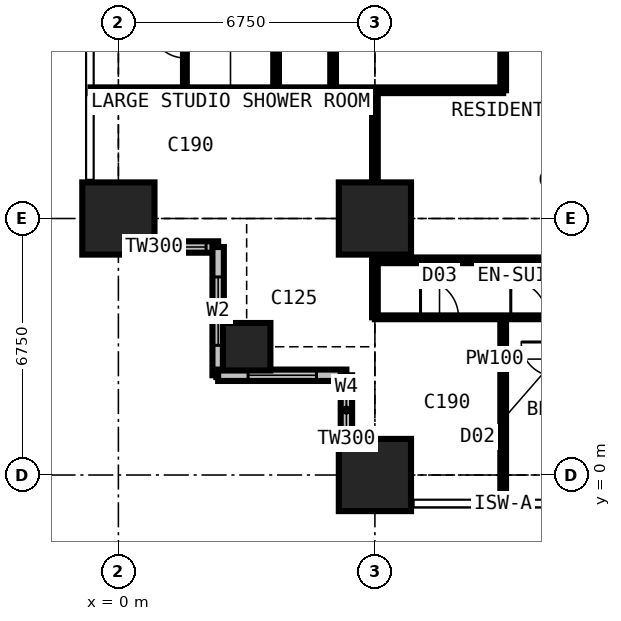
"""IFC4 building model, lengths in metres.
Left out: names, types, materials, properties, quantities, classifications, styles, units other than length and angle.
Written with IfcOpenShell. Run it as: python <this file> out.ifc"""

import sys

from ifc_helpers import new_model, si_unit, direction, frame, frame_2d, origin, origin_2d, place, context, subcontext, project, spatial, rectangle, extrude, element, fill, save


model = new_model("IFC4")
c1 = context("Model", 3, precision=1e-05, world=origin(), true_north=direction((0.0, 1.0)))
c2 = subcontext(c1, "Body", "Model", "MODEL_VIEW")
j1 = project(units=[si_unit("LENGTHUNIT", "METRE"), si_unit("PLANEANGLEUNIT", "RADIAN")], contexts=[c1])
p1 = place(None, origin())
s1 = spatial("IfcSite", under=j1, at=p1, CompositionType="ELEMENT")
p2 = place(p1, origin())
s2 = spatial("IfcBuilding", under=s1, at=p2, CompositionType="ELEMENT")
p3 = place(p2, frame((0.0, 0.0, 39.6)))
s3 = spatial("IfcBuildingStorey", under=s2, at=p3, CompositionType="ELEMENT", Elevation=39.6)
p4 = place(p3, frame((0.0, 6.75, 0.0), z_axis=(0.0, 0.0, 1.0), x_axis=(1.0, 0.0, 0.0)))
e1 = element("IfcColumn", 1, at=p4, inside=s3, PredefinedType="COLUMN", context=c2, shape_type="SweptSolid", body=[
    extrude(rectangle(XDim=1.9, YDim=1.9, at=origin_2d()), origin(), (0.0, 0.0, 1.0), 3.6),
])
p5 = place(p3, frame((3.375, 3.375, 0.0), z_axis=(0.0, 0.0, 1.0), x_axis=(1.0, 0.0, 0.0)))
e2 = element("IfcColumn", 2, at=p5, inside=s3, PredefinedType="COLUMN", context=c2, shape_type="SweptSolid", body=[
    extrude(rectangle(XDim=1.25, YDim=1.25, at=origin_2d()), origin(), (0.0, 0.0, 1.0), 3.6),
])
for number, where, z_axis, x_axis in (
    (3, (6.75, 0.0, 0.0), (0.0, 0.0, 1.0), (1.0, 0.0, 0.0)),
    (4, (6.75, 6.75, 0.0), (0.0, 0.0, 1.0), (1.0, 0.0, 0.0)),
):
    element("IfcColumn", number, at=place(p3, frame(where, z_axis=z_axis, x_axis=x_axis)), inside=s3, PredefinedType="COLUMN", context=c2, shape_type="SweptSolid", body=[
        extrude(rectangle(XDim=1.9, YDim=1.9, at=origin_2d()), origin(), (0.0, 0.0, 1.0), 3.6),
    ])
p6 = place(p3, frame((-0.75, 6.0, 0.0), z_axis=(0.0, 0.0, 1.0), x_axis=(1.0, 0.0, 0.0)))
e5 = element("IfcWall", 5, at=p6, inside=s3, PredefinedType="SOLIDWALL", context=c2, shape_type="SweptSolid", body=[
    extrude(rectangle(XDim=3.375, YDim=0.3, at=frame_2d((1.688, 0.0))), origin(), (0.0, 0.0, 1.0), 3.375),
])
p7 = place(p6, frame((1.857, 0.0, 0.9)))
e6 = element("IfcOpeningElement", 6, at=p7, cuts=e5, PredefinedType="OPENING", context=c2, shape_type="SweptSolid", body=[
    extrude(rectangle(XDim=1.2, YDim=1.8, at=frame_2d((0.6, 0.9))), frame((0.0, 0.16, 0.0), z_axis=(0.0, -1.0, 0.0), x_axis=(1.0, 0.0, 0.0)), (0.0, 0.0, 1.0), 0.32),
])
p8 = place(p3, frame((2.625, 6.0, 0.0), z_axis=(0.0, 0.0, 1.0), x_axis=(0.0, -1.0, 0.0)))
e7 = element("IfcWall", 7, at=p8, inside=s3, PredefinedType="SOLIDWALL", context=c2, shape_type="SweptSolid", body=[
    extrude(rectangle(XDim=3.375, YDim=0.3, at=frame_2d((1.688, 0.0))), origin(), (0.0, 0.0, 1.0), 3.375),
])
p9 = place(p8, frame((0.788, 0.0, 0.6)))
e8 = element("IfcOpeningElement", 8, at=p9, cuts=e7, PredefinedType="OPENING", context=c2, shape_type="SweptSolid", body=[
    extrude(rectangle(XDim=1.8, YDim=2.1, at=frame_2d((0.9, 1.05))), frame((0.0, 0.16, 0.0), z_axis=(0.0, -1.0, 0.0), x_axis=(1.0, 0.0, 0.0)), (0.0, 0.0, 1.0), 0.32),
])
p10 = place(p3, frame((2.625, 2.625, 0.0), z_axis=(0.0, 0.0, 1.0), x_axis=(1.0, 0.0, 0.0)))
e9 = element("IfcWall", 9, at=p10, inside=s3, PredefinedType="SOLIDWALL", context=c2, shape_type="SweptSolid", body=[
    extrude(rectangle(XDim=3.375, YDim=0.3, at=frame_2d((1.688, 0.0))), origin(), (0.0, 0.0, 1.0), 3.375),
])
p11 = place(p10, frame((0.788, 0.0, 0.6)))
e10 = element("IfcOpeningElement", 10, at=p11, cuts=e9, PredefinedType="OPENING", context=c2, shape_type="SweptSolid", body=[
    extrude(rectangle(XDim=1.8, YDim=2.1, at=frame_2d((0.9, 1.05))), frame((0.0, 0.16, 0.0), z_axis=(0.0, -1.0, 0.0), x_axis=(1.0, 0.0, 0.0)), (0.0, 0.0, 1.0), 0.32),
])
p12 = place(p3, frame((6.0, 2.625, 0.0), z_axis=(0.0, 0.0, 1.0), x_axis=(0.0, -1.0, 0.0)))
e11 = element("IfcWall", 11, at=p12, inside=s3, PredefinedType="SOLIDWALL", context=c2, shape_type="SweptSolid", body=[
    extrude(rectangle(XDim=3.375, YDim=0.3, at=frame_2d((1.688, 0.0))), origin(), (0.0, 0.0, 1.0), 3.375),
])
p13 = place(p12, frame((0.317, 0.0, 0.9)))
e12 = element("IfcOpeningElement", 12, at=p13, cuts=e11, PredefinedType="OPENING", context=c2, shape_type="SweptSolid", body=[
    extrude(rectangle(XDim=1.2, YDim=1.8, at=frame_2d((0.6, 0.9))), frame((0.0, 0.16, 0.0), z_axis=(0.0, -1.0, 0.0), x_axis=(1.0, 0.0, 0.0)), (0.0, 0.0, 1.0), 0.32),
])
p14 = place(p3, frame((-0.734, 10.125, 0.0), z_axis=(0.0, 0.0, 1.0), x_axis=(1.0, 0.0, 0.0)))
e13 = element("IfcWall", 13, at=p14, inside=s3, PredefinedType="PARTITIONING", context=c2, shape_type="SweptSolid", body=[
    extrude(rectangle(XDim=10.859, YDim=0.15, at=frame_2d((5.429, 0.0))), origin(), (0.0, 0.0, 1.0), 3.375),
])
p15 = place(p3, frame((1.75, 10.125, 0.0), z_axis=(0.0, 0.0, 1.0), x_axis=(0.0, 1.0, 0.0)))
e14 = element("IfcWall", 14, at=p15, inside=s3, PredefinedType="PARTITIONING", context=c2, shape_type="SweptSolid", body=[
    extrude(rectangle(XDim=2.6, YDim=0.1, at=frame_2d((1.3, 0.0))), origin(), (0.0, 0.0, 1.0), 3.375),
])
p16 = place(p15, frame((0.85, 0.0, 0.0)))
e15 = element("IfcOpeningElement", 15, at=p16, cuts=e14, PredefinedType="OPENING", context=c2, shape_type="SweptSolid", body=[
    extrude(rectangle(XDim=0.9, YDim=2.2, at=frame_2d((0.45, 1.1))), frame((0.0, 0.06, 0.0), z_axis=(0.0, -1.0, 0.0), x_axis=(1.0, 0.0, 0.0)), (0.0, 0.0, 1.0), 0.12),
])
p17 = place(p3, frame((4.15, 10.125, 0.0), z_axis=(0.0, 0.0, 1.0), x_axis=(0.0, 1.0, 0.0)))
e16 = element("IfcWall", 16, at=p17, inside=s3, PredefinedType="PARTITIONING", context=c2, shape_type="SweptSolid", body=[
    extrude(rectangle(XDim=23.625, YDim=0.15, at=frame_2d((11.812, 0.0))), origin(), (0.0, 0.0, 1.0), 3.375),
])
p18 = place(p17, frame((4.2, 0.0, 0.0)))
e17 = element("IfcOpeningElement", 17, at=p18, cuts=e16, PredefinedType="OPENING", context=c2, shape_type="SweptSolid", body=[
    extrude(rectangle(XDim=0.95, YDim=2.2, at=frame_2d((0.475, 1.1))), frame((0.0, 0.085, 0.0), z_axis=(0.0, -1.0, 0.0), x_axis=(1.0, 0.0, 0.0)), (0.0, 0.0, 1.0), 0.17),
])
p19 = place(p17, frame((10.95, 0.0, 0.0)))
e18 = element("IfcOpeningElement", 18, at=p19, cuts=e16, PredefinedType="OPENING", context=c2, shape_type="SweptSolid", body=[
    extrude(rectangle(XDim=0.95, YDim=2.2, at=frame_2d((0.475, 1.1))), frame((0.0, 0.085, 0.0), z_axis=(0.0, -1.0, 0.0), x_axis=(1.0, 0.0, 0.0)), (0.0, 0.0, 1.0), 0.17),
])
p20 = place(p17, frame((17.7, 0.0, 0.0)))
e19 = element("IfcOpeningElement", 19, at=p20, cuts=e16, PredefinedType="OPENING", context=c2, shape_type="SweptSolid", body=[
    extrude(rectangle(XDim=0.95, YDim=2.2, at=frame_2d((0.475, 1.1))), frame((0.0, 0.085, 0.0), z_axis=(0.0, -1.0, 0.0), x_axis=(1.0, 0.0, 0.0)), (0.0, 0.0, 1.0), 0.17),
])
p21 = place(p3, frame((5.65, 10.125, 0.0), z_axis=(0.0, 0.0, 1.0), x_axis=(0.0, 1.0, 0.0)))
e20 = element("IfcWall", 20, at=p21, inside=s3, PredefinedType="PARTITIONING", context=c2, shape_type="SweptSolid", body=[
    extrude(rectangle(XDim=10.762, YDim=0.15, at=frame_2d((5.381, 0.0))), origin(), (0.0, 0.0, 1.0), 3.375),
])
p22 = place(p21, frame((4.9, 0.0, 0.0)))
e21 = element("IfcOpeningElement", 21, at=p22, cuts=e20, PredefinedType="OPENING", context=c2, shape_type="SweptSolid", body=[
    extrude(rectangle(XDim=0.95, YDim=2.2, at=frame_2d((0.475, 1.1))), frame((0.0, 0.085, 0.0), z_axis=(0.0, -1.0, 0.0), x_axis=(1.0, 0.0, 0.0)), (0.0, 0.0, 1.0), 0.17),
])
p23 = place(p3, frame((6.75, 4.15, 0.0), z_axis=(0.0, 0.0, 1.0), x_axis=(0.0, 1.0, 0.0)))
e22 = element("IfcWall", 22, at=p23, inside=s3, PredefinedType="PARTITIONING", context=c2, shape_type="SweptSolid", body=[
    extrude(rectangle(XDim=5.975, YDim=0.15, at=frame_2d((2.988, 0.0))), origin(), (0.0, 0.0, 1.0), 2.877),
])
p24 = place(p3, frame((6.75, 4.15, 0.0), z_axis=(0.0, 0.0, 1.0), x_axis=(1.0, 0.0, 0.0)))
e23 = element("IfcWall", 23, at=p24, inside=s3, PredefinedType="PARTITIONING", context=c2, shape_type="SweptSolid", body=[
    extrude(rectangle(XDim=23.625, YDim=0.1, at=frame_2d((11.812, 0.0))), origin(), (0.0, 0.0, 1.0), 3.375),
])
p25 = place(p24, frame((1.2, 0.0, 0.0)))
e24 = element("IfcOpeningElement", 24, at=p25, cuts=e23, PredefinedType="OPENING", context=c2, shape_type="SweptSolid", body=[
    extrude(rectangle(XDim=1.0, YDim=2.2, at=frame_2d((0.5, 1.1))), frame((0.0, 0.06, 0.0), z_axis=(0.0, -1.0, 0.0), x_axis=(1.0, 0.0, 0.0)), (0.0, 0.0, 1.0), 0.12),
])
p26 = place(p24, frame((3.575, 0.0, 0.0)))
e25 = element("IfcOpeningElement", 25, at=p26, cuts=e23, PredefinedType="OPENING", context=c2, shape_type="SweptSolid", body=[
    extrude(rectangle(XDim=0.95, YDim=2.2, at=frame_2d((0.475, 1.1))), frame((0.0, 0.06, 0.0), z_axis=(0.0, -1.0, 0.0), x_axis=(1.0, 0.0, 0.0)), (0.0, 0.0, 1.0), 0.12),
])
p27 = place(p24, frame((7.0, 0.0, 0.0)))
e26 = element("IfcOpeningElement", 26, at=p27, cuts=e23, PredefinedType="OPENING", context=c2, shape_type="SweptSolid", body=[
    extrude(rectangle(XDim=0.95, YDim=2.2, at=frame_2d((0.475, 1.1))), frame((0.0, 0.06, 0.0), z_axis=(0.0, -1.0, 0.0), x_axis=(1.0, 0.0, 0.0)), (0.0, 0.0, 1.0), 0.12),
])
p28 = place(p24, frame((10.375, 0.0, 0.0)))
e27 = element("IfcOpeningElement", 27, at=p28, cuts=e23, PredefinedType="OPENING", context=c2, shape_type="SweptSolid", body=[
    extrude(rectangle(XDim=0.95, YDim=2.2, at=frame_2d((0.475, 1.1))), frame((0.0, 0.06, 0.0), z_axis=(0.0, -1.0, 0.0), x_axis=(1.0, 0.0, 0.0)), (0.0, 0.0, 1.0), 0.12),
])
p29 = place(p24, frame((13.7, 0.0, 0.0)))
e28 = element("IfcOpeningElement", 28, at=p29, cuts=e23, PredefinedType="OPENING", context=c2, shape_type="SweptSolid", body=[
    extrude(rectangle(XDim=0.95, YDim=2.2, at=frame_2d((0.475, 1.1))), frame((0.0, 0.06, 0.0), z_axis=(0.0, -1.0, 0.0), x_axis=(1.0, 0.0, 0.0)), (0.0, 0.0, 1.0), 0.12),
])
p30 = place(p24, frame((17.125, 0.0, 0.0)))
e29 = element("IfcOpeningElement", 29, at=p30, cuts=e23, PredefinedType="OPENING", context=c2, shape_type="SweptSolid", body=[
    extrude(rectangle(XDim=0.95, YDim=2.2, at=frame_2d((0.475, 1.1))), frame((0.0, 0.06, 0.0), z_axis=(0.0, -1.0, 0.0), x_axis=(1.0, 0.0, 0.0)), (0.0, 0.0, 1.0), 0.12),
])
p31 = place(p24, frame((20.5, 0.0, 0.0)))
e30 = element("IfcOpeningElement", 30, at=p31, cuts=e23, PredefinedType="OPENING", context=c2, shape_type="SweptSolid", body=[
    extrude(rectangle(XDim=0.95, YDim=2.2, at=frame_2d((0.475, 1.1))), frame((0.0, 0.06, 0.0), z_axis=(0.0, -1.0, 0.0), x_axis=(1.0, 0.0, 0.0)), (0.0, 0.0, 1.0), 0.12),
])
p32 = place(p3, frame((6.75, 5.65, 0.0), z_axis=(0.0, 0.0, 1.0), x_axis=(1.0, 0.0, 0.0)))
e31 = element("IfcWall", 31, at=p32, inside=s3, PredefinedType="PARTITIONING", context=c2, shape_type="SweptSolid", body=[
    extrude(rectangle(XDim=11.05, YDim=0.15, at=frame_2d((5.525, 0.0))), origin(), (0.0, 0.0, 1.0), 3.375),
])
p33 = place(p3, frame((10.125, -0.734, 0.0), z_axis=(0.0, 0.0, 1.0), x_axis=(0.0, 1.0, 0.0)))
e32 = element("IfcWall", 32, at=p33, inside=s3, PredefinedType="PARTITIONING", context=c2, shape_type="SweptSolid", body=[
    extrude(rectangle(XDim=4.884, YDim=0.15, at=frame_2d((2.442, 0.0))), origin(), (0.0, 0.0, 1.0), 3.375),
])
p34 = place(p3, frame((10.125, 10.125, 0.0), z_axis=(0.0, 0.0, 1.0), x_axis=(0.0, 1.0, 0.0)))
e33 = element("IfcWall", 33, at=p34, inside=s3, PredefinedType="PARTITIONING", context=c2, shape_type="SweptSolid", body=[
    extrude(rectangle(XDim=1.175, YDim=0.15, at=frame_2d((0.587, 0.0))), origin(), (0.0, 0.0, 1.0), 3.375),
])
p35 = place(p7, origin())
e34 = element("IfcWindow", 34, at=p35, inside=s3, PartitioningType="SINGLE_PANEL", PredefinedType="WINDOW", context=c2, shape_type="SweptSolid", body=[
    extrude(rectangle(XDim=1.2, YDim=1.8, at=frame_2d((0.6, 0.9))), frame((0.0, 0.03, 0.0), z_axis=(0.0, -1.0, 0.0), x_axis=(1.0, 0.0, 0.0)), (0.0, 0.0, 1.0), 0.06),
])
fill(e6, e34)
p36 = place(p9, origin())
e35 = element("IfcWindow", 35, at=p36, inside=s3, PartitioningType="SINGLE_PANEL", PredefinedType="WINDOW", context=c2, shape_type="SweptSolid", body=[
    extrude(rectangle(XDim=1.8, YDim=2.1, at=frame_2d((0.9, 1.05))), frame((0.0, 0.03, 0.0), z_axis=(0.0, -1.0, 0.0), x_axis=(1.0, 0.0, 0.0)), (0.0, 0.0, 1.0), 0.06),
])
fill(e8, e35)
p37 = place(p11, origin())
e36 = element("IfcWindow", 36, at=p37, inside=s3, PartitioningType="SINGLE_PANEL", PredefinedType="WINDOW", context=c2, shape_type="SweptSolid", body=[
    extrude(rectangle(XDim=1.8, YDim=2.1, at=frame_2d((0.9, 1.05))), frame((0.0, 0.03, 0.0), z_axis=(0.0, -1.0, 0.0), x_axis=(1.0, 0.0, 0.0)), (0.0, 0.0, 1.0), 0.06),
])
fill(e10, e36)
p38 = place(p13, origin())
e37 = element("IfcWindow", 37, at=p38, inside=s3, PartitioningType="SINGLE_PANEL", PredefinedType="WINDOW", context=c2, shape_type="SweptSolid", body=[
    extrude(rectangle(XDim=1.2, YDim=1.8, at=frame_2d((0.6, 0.9))), frame((0.0, 0.03, 0.0), z_axis=(0.0, -1.0, 0.0), x_axis=(1.0, 0.0, 0.0)), (0.0, 0.0, 1.0), 0.06),
])
fill(e12, e37)
p39 = place(p25, origin())
e38 = element("IfcDoor", 38, at=p39, inside=s3, OperationType="SINGLE_SWING_LEFT", PredefinedType="DOOR", context=c2, shape_type="SweptSolid", body=[
    extrude(rectangle(XDim=1.0, YDim=2.2, at=frame_2d((0.5, 1.1))), frame((0.0, 0.025, 0.0), z_axis=(0.0, -1.0, 0.0), x_axis=(1.0, 0.0, 0.0)), (0.0, 0.0, 1.0), 0.05),
])
fill(e24, e38)
p40 = place(p26, origin())
e39 = element("IfcDoor", 39, at=p40, inside=s3, OperationType="SINGLE_SWING_LEFT", PredefinedType="DOOR", context=c2, shape_type="SweptSolid", body=[
    extrude(rectangle(XDim=0.95, YDim=2.2, at=frame_2d((0.475, 1.1))), frame((0.0, 0.025, 0.0), z_axis=(0.0, -1.0, 0.0), x_axis=(1.0, 0.0, 0.0)), (0.0, 0.0, 1.0), 0.05),
])
fill(e25, e39)
p41 = place(p16, origin())
e40 = element("IfcDoor", 40, at=p41, inside=s3, OperationType="SINGLE_SWING_RIGHT", PredefinedType="DOOR", context=c2, shape_type="SweptSolid", body=[
    extrude(rectangle(XDim=0.9, YDim=2.2, at=frame_2d((0.45, 1.1))), frame((0.0, 0.025, 0.0), z_axis=(0.0, -1.0, 0.0), x_axis=(1.0, 0.0, 0.0)), (0.0, 0.0, 1.0), 0.05),
])
fill(e15, e40)
save(model, sys.argv[1])
